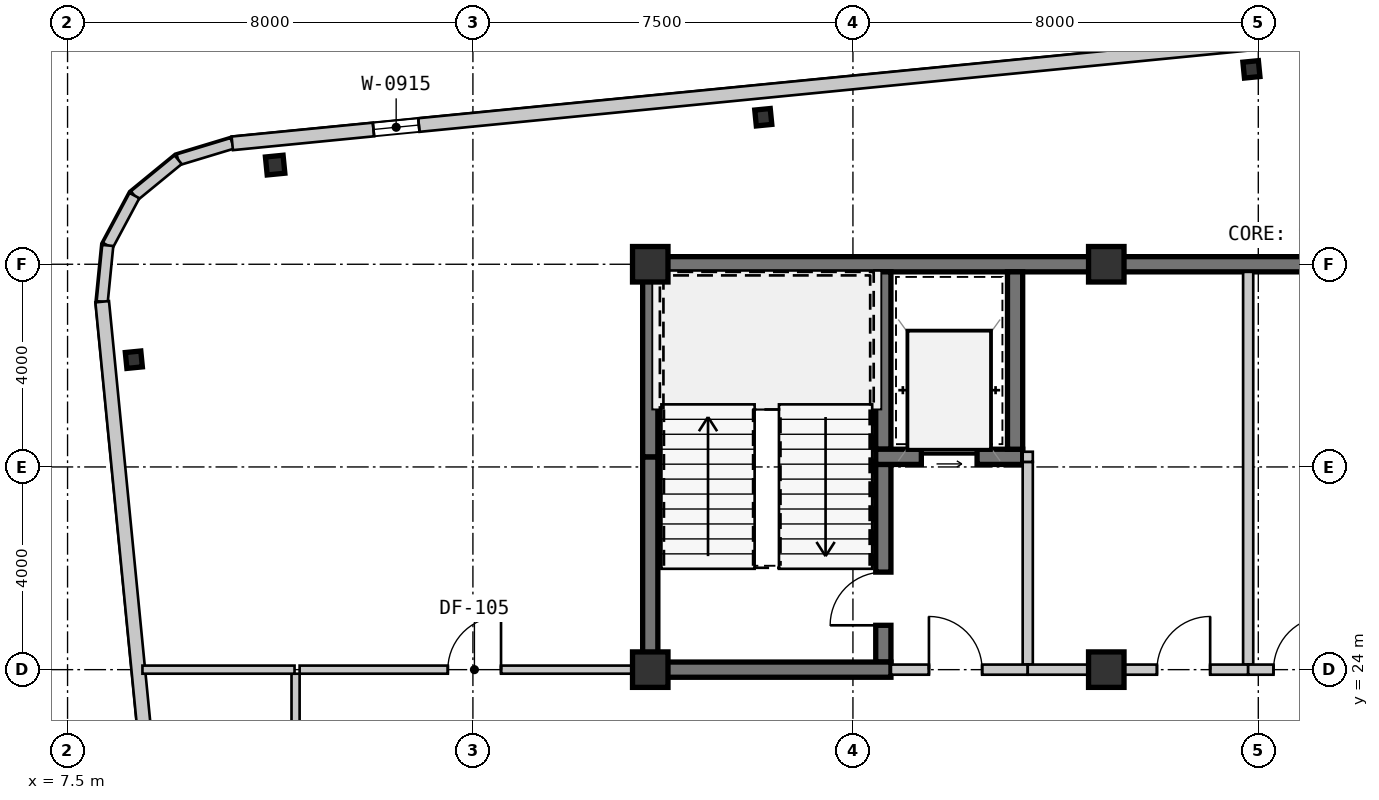
"""IFC4 building model, lengths in metres.
Left out: names, types, materials, properties, quantities, classifications, styles, units other than length and angle.
Written with IfcOpenShell. Run it as: python <this file> out.ifc"""

import sys

from ifc_helpers import new_model, si_unit, direction, frame, frame_2d, origin, origin_2d, place, context, subcontext, project, spatial, rectangle, i_section, extrude, source, transform, mapped, element, fill, save


model = new_model("IFC4")
c1 = context("Model", 3, precision=1e-05, world=origin(), true_north=direction((0.0, 1.0)))
c2 = subcontext(c1, "Body", "Model", "MODEL_VIEW")
j1 = project(units=[si_unit("LENGTHUNIT", "METRE"), si_unit("PLANEANGLEUNIT", "RADIAN")], contexts=[c1])
p1 = place(None, origin())
s1 = spatial("IfcSite", under=j1, at=p1, CompositionType="ELEMENT")
p2 = place(p1, origin())
s2 = spatial("IfcBuilding", under=s1, at=p2, CompositionType="ELEMENT")
p3 = place(p2, frame((0.0, 0.0, 112.35)))
s3 = spatial("IfcBuildingStorey", under=s2, at=p3, CompositionType="ELEMENT", Elevation=112.35)
m1 = source(origin(), c2, "Body", "SweptSolid", [
    extrude(rectangle(XDim=0.7, YDim=0.7, at=origin_2d()), origin(), (0.0, 0.0, 1.0), 4.2),
])
for number, where, z_axis, x_axis in (
    (1, (19.0, 24.0, 0.0), (0.0, 0.0, 1.0), (1.0, 0.0, 0.0)),
    (2, (28.0, 24.0, 0.0), (0.0, 0.0, 1.0), (1.0, 0.0, 0.0)),
    (3, (19.0, 32.0, 0.0), (0.0, 0.0, 1.0), (1.0, 0.0, 0.0)),
    (4, (28.0, 32.0, 0.0), (0.0, 0.0, 1.0), (1.0, 0.0, 0.0)),
):
    element("IfcColumn", number, at=place(p3, frame(where, z_axis=z_axis, x_axis=x_axis)), inside=s3, PredefinedType="COLUMN", context=c2, shape_type="MappedRepresentation", body=[
        mapped(m1, transform((0.0, 0.0, 0.0), scale=1.0)),
    ])
m2 = source(origin(), c2, "Body", "SweptSolid", [
    extrude(i_section(OverallWidth=0.35, OverallDepth=0.356, WebThickness=0.018, FlangeThickness=0.028, at=origin_2d()), origin(), (0.0, 0.0, 1.0), 4.2),
])
p4 = place(p3, frame((11.597, 33.957, 0.0), z_axis=(0.0, 0.0, 1.0), x_axis=(0.995227399982, 0.097582899759, 0.0)))
e5 = element("IfcColumn", 5, at=p4, inside=s3, PredefinedType="COLUMN", context=c2, shape_type="MappedRepresentation", body=[
    mapped(m2, transform((0.0, 0.0, 0.0), scale=1.0)),
])
m3 = source(origin(), c2, "Body", "SweptSolid", [
    extrude(i_section(OverallWidth=0.307, OverallDepth=0.315, WebThickness=0.012, FlangeThickness=0.019, at=origin_2d()), origin(), (0.0, 0.0, 1.0), 4.2),
])
for number, where, z_axis, x_axis in (
    (6, (21.231, 34.901, 0.0), (0.0, 0.0, 1.0), (0.995, 0.098, 0.0)),
    (7, (30.865, 35.846, 0.0), (0.0, 0.0, 1.0), (0.995, 0.098, 0.0)),
    (8, (8.808, 30.116, 0.0), (0.0, 0.0, 1.0), (0.995, 0.098, 0.0)),
):
    element("IfcColumn", number, at=place(p3, frame(where, z_axis=z_axis, x_axis=x_axis)), inside=s3, PredefinedType="COLUMN", context=c2, shape_type="MappedRepresentation", body=[
        mapped(m3, transform((0.0, 0.0, 0.0), scale=1.0)),
    ])
m4 = source(origin(), c2, "Body", "SweptSolid", [
    extrude(rectangle(XDim=1.116, YDim=0.22, at=frame_2d((0.558, 0.0))), origin(), (0.0, 0.0, 1.0), 3.78),
])
p5 = place(p3, frame((10.751, 34.386, 0.0), z_axis=(0.0, 0.0, 1.0), x_axis=(-0.957070388811, -0.289855603468, 0.0)))
e9 = element("IfcWall", 9, at=p5, inside=s3, PredefinedType="SOLIDWALL", context=c2, shape_type="MappedRepresentation", body=[
    mapped(m4, transform((0.0, 0.0, 0.0), scale=1.0)),
])
m5 = source(origin(), c2, "Body", "SweptSolid", [
    extrude(rectangle(XDim=1.116, YDim=0.22, at=frame_2d((0.558, 0.0))), origin(), (0.0, 0.0, 1.0), 3.78),
])
p6 = place(p3, frame((9.683, 34.063, 0.0), z_axis=(0.0, 0.0, 1.0), x_axis=(-0.773254916409, -0.634095287989, 0.0)))
e10 = element("IfcWall", 10, at=p6, inside=s3, PredefinedType="SOLIDWALL", context=c2, shape_type="MappedRepresentation", body=[
    mapped(m5, transform((0.0, 0.0, 0.0), scale=1.0)),
])
m6 = source(origin(), c2, "Body", "SweptSolid", [
    extrude(rectangle(XDim=1.116, YDim=0.22, at=frame_2d((0.558, 0.0))), origin(), (0.0, 0.0, 1.0), 3.78),
])
p7 = place(p3, frame((8.82, 33.355, 0.0), z_axis=(0.0, 0.0, 1.0), x_axis=(-0.471802540493, -0.881704237704, 0.0)))
e11 = element("IfcWall", 11, at=p7, inside=s3, PredefinedType="SOLIDWALL", context=c2, shape_type="MappedRepresentation", body=[
    mapped(m6, transform((0.0, 0.0, 0.0), scale=1.0)),
])
p8 = place(p3, frame((8.293, 32.371, 0.0), z_axis=(0.0, 0.0, 1.0), x_axis=(-0.098463783145, -0.99514063499, 0.0)))
e12 = element("IfcWall", 12, at=p8, inside=s3, PredefinedType="SOLIDWALL", context=c2, shape_type="MappedRepresentation", body=[
    mapped(m5, transform((0.0, 0.0, 0.0), scale=1.0)),
])
m7 = source(origin(), c2, "Body", "SweptSolid", [
    extrude(rectangle(XDim=50.0, YDim=0.27, at=frame_2d((25.0, 0.0))), origin(), (0.0, 0.0, 1.0), 3.78),
])
p9 = place(p3, frame((60.512, 39.266, 0.0), z_axis=(0.0, 0.0, 1.0), x_axis=(-0.995227362914, -0.0975832778, 0.0)))
e13 = element("IfcWall", 13, at=p9, inside=s3, PredefinedType="SOLIDWALL", context=c2, shape_type="MappedRepresentation", body=[
    mapped(m7, transform((0.0, 0.0, 0.0), scale=1.0)),
])
m8 = source(origin(), c2, "Body", "SweptSolid", [
    extrude(rectangle(XDim=0.9, YDim=1.5, at=frame_2d((0.45, 0.75))), frame((0.0, 0.145, 0.0), z_axis=(0.0, -1.0, 0.0), x_axis=(1.0, 0.0, 0.0)), (0.0, 0.0, 1.0), 0.29),
])
p10 = place(p9, frame((2.8, 0.0, 0.7)))
e14 = element("IfcOpeningElement", 14, at=p10, cuts=e13, PredefinedType="OPENING", context=c2, shape_type="MappedRepresentation", body=[
    mapped(m8, transform((0.0, 0.0, 0.0), scale=1.0)),
])
p11 = place(p9, frame((46.3, 0.0, 1.6)))
e15 = element("IfcOpeningElement", 15, at=p11, cuts=e13, PredefinedType="OPENING", context=c2, shape_type="MappedRepresentation", body=[
    mapped(m8, transform((0.0, 0.0, 0.0), scale=1.0)),
])
m9 = source(origin(), c2, "Body", "SweptSolid", [
    extrude(rectangle(XDim=15.207, YDim=0.27, at=frame_2d((7.603, 0.0))), origin(), (0.0, 0.0, 1.0), 3.78),
])
p12 = place(p3, frame((8.184, 31.261, 0.0), z_axis=(0.0, 0.0, 1.0), x_axis=(0.097581713594, -0.995227516286, 0.0)))
e16 = element("IfcWall", 16, at=p12, inside=s3, PredefinedType="SOLIDWALL", context=c2, shape_type="MappedRepresentation", body=[
    mapped(m9, transform((0.0, 0.0, 0.0), scale=1.0)),
])
m10 = source(origin(), c2, "Body", "SweptSolid", [
    extrude(rectangle(XDim=9.15, YDim=0.3, at=frame_2d((4.575, 0.0))), origin(), (0.0, 0.0, 1.0), 3.78),
])
p13 = place(p3, frame((18.85, 32.0, 0.0), z_axis=(0.0, 0.0, 1.0), x_axis=(1.0, 0.0, 0.0)))
e17 = element("IfcWall", 17, at=p13, inside=s3, PredefinedType="SHEAR", context=c2, shape_type="MappedRepresentation", body=[
    mapped(m10, transform((0.0, 0.0, 0.0), scale=1.0)),
])
m11 = source(origin(), c2, "Body", "SweptSolid", [
    extrude(rectangle(XDim=11.2, YDim=0.3, at=frame_2d((5.6, 0.0))), origin(), (0.0, 0.0, 1.0), 3.78),
])
p14 = place(p3, frame((28.0, 32.0, 0.0), z_axis=(0.0, 0.0, 1.0), x_axis=(1.0, 0.0, 0.0)))
e18 = element("IfcWall", 18, at=p14, inside=s3, PredefinedType="SHEAR", context=c2, shape_type="MappedRepresentation", body=[
    mapped(m11, transform((0.0, 0.0, 0.0), scale=1.0)),
])
m12 = source(origin(), c2, "Body", "SweptSolid", [
    extrude(rectangle(XDim=4.05, YDim=0.3, at=frame_2d((2.025, 0.0))), origin(), (0.0, 0.0, 1.0), 3.78),
])
p15 = place(p3, frame((19.0, 24.15, 0.0), z_axis=(0.0, 0.0, 1.0), x_axis=(0.0, 1.0, 0.0)))
e19 = element("IfcWall", 19, at=p15, inside=s3, PredefinedType="SHEAR", context=c2, shape_type="MappedRepresentation", body=[
    mapped(m12, transform((0.0, 0.0, 0.0), scale=1.0)),
])
m13 = source(origin(), c2, "Body", "SweptSolid", [
    extrude(rectangle(XDim=3.65, YDim=0.3, at=frame_2d((1.825, 0.0))), origin(), (0.0, 0.0, 1.0), 3.78),
])
p16 = place(p3, frame((19.0, 28.2, 0.0), z_axis=(0.0, 0.0, 1.0), x_axis=(0.0, 1.0, 0.0)))
e20 = element("IfcWall", 20, at=p16, inside=s3, PredefinedType="SHEAR", context=c2, shape_type="MappedRepresentation", body=[
    mapped(m13, transform((0.0, 0.0, 0.0), scale=1.0)),
])
m14 = source(origin(), c2, "Body", "SweptSolid", [
    extrude(rectangle(XDim=3.5, YDim=0.3, at=frame_2d((1.75, 0.0))), origin(), (0.0, 0.0, 1.0), 3.78),
])
p17 = place(p3, frame((23.6, 28.35, 0.0), z_axis=(0.0, 0.0, 1.0), x_axis=(0.0, 1.0, 0.0)))
e21 = element("IfcWall", 21, at=p17, inside=s3, PredefinedType="SHEAR", context=c2, shape_type="MappedRepresentation", body=[
    mapped(m14, transform((0.0, 0.0, 0.0), scale=1.0)),
])
m15 = source(origin(), c2, "Body", "SweptSolid", [
    extrude(rectangle(XDim=3.9, YDim=0.3, at=frame_2d((1.95, 0.0))), origin(), (0.0, 0.0, 1.0), 3.78),
])
p18 = place(p3, frame((23.6, 24.15, 0.0), z_axis=(0.0, 0.0, 1.0), x_axis=(0.0, 1.0, 0.0)))
e22 = element("IfcWall", 22, at=p18, inside=s3, PredefinedType="SHEAR", context=c2, shape_type="MappedRepresentation", body=[
    mapped(m15, transform((0.0, 0.0, 0.0), scale=1.0)),
])
m16 = source(origin(), c2, "Body", "SweptSolid", [
    extrude(rectangle(XDim=1.05, YDim=2.1, at=frame_2d((0.525, 1.05))), frame((0.0, 0.16, 0.0), z_axis=(0.0, -1.0, 0.0), x_axis=(1.0, 0.0, 0.0)), (0.0, 0.0, 1.0), 0.32),
])
p19 = place(p18, frame((0.725, 0.0, 0.0)))
e23 = element("IfcOpeningElement", 23, at=p19, cuts=e22, PredefinedType="OPENING", context=c2, shape_type="MappedRepresentation", body=[
    mapped(m16, transform((0.0, 0.0, 0.0), scale=1.0)),
])
m17 = source(origin(), c2, "Body", "SweptSolid", [
    extrude(rectangle(XDim=4.9, YDim=0.3, at=frame_2d((2.45, 0.0))), origin(), (0.0, 0.0, 1.0), 3.78),
])
p20 = place(p3, frame((18.85, 24.0, 0.0), z_axis=(0.0, 0.0, 1.0), x_axis=(1.0, 0.0, 0.0)))
e24 = element("IfcWall", 24, at=p20, inside=s3, PredefinedType="SHEAR", context=c2, shape_type="MappedRepresentation", body=[
    mapped(m17, transform((0.0, 0.0, 0.0), scale=1.0)),
])
m18 = source(origin(), c2, "Body", "SweptSolid", [
    extrude(rectangle(XDim=2.9, YDim=0.3, at=frame_2d((1.45, 0.0))), origin(), (0.0, 0.0, 1.0), 3.78),
])
p21 = place(p3, frame((23.45, 28.2, 0.0), z_axis=(0.0, 0.0, 1.0), x_axis=(1.0, 0.0, 0.0)))
e25 = element("IfcWall", 25, at=p21, inside=s3, PredefinedType="SHEAR", context=c2, shape_type="MappedRepresentation", body=[
    mapped(m18, transform((0.0, 0.0, 0.0), scale=1.0)),
])
m19 = source(origin(), c2, "Body", "SweptSolid", [
    extrude(rectangle(XDim=1.1, YDim=2.15, at=frame_2d((0.55, 1.075))), frame((0.0, 0.16, 0.0), z_axis=(0.0, -1.0, 0.0), x_axis=(1.0, 0.0, 0.0)), (0.0, 0.0, 1.0), 0.32),
])
p22 = place(p21, frame((0.9, 0.0, 0.0)))
e26 = element("IfcOpeningElement", 26, at=p22, cuts=e25, PredefinedType="OPENING", context=c2, shape_type="MappedRepresentation", body=[
    mapped(m19, transform((0.0, 0.0, 0.0), scale=1.0)),
])
p23 = place(p3, frame((26.2, 28.35, 0.0), z_axis=(0.0, 0.0, 1.0), x_axis=(0.0, 1.0, 0.0)))
e27 = element("IfcWall", 27, at=p23, inside=s3, PredefinedType="SHEAR", context=c2, shape_type="MappedRepresentation", body=[
    mapped(m14, transform((0.0, 0.0, 0.0), scale=1.0)),
])
m20 = source(origin(), c2, "Body", "SweptSolid", [
    extrude(rectangle(XDim=4.0, YDim=0.2, at=frame_2d((2.0, 0.0))), origin(), (0.0, 0.0, 1.0), 3.78),
])
p24 = place(p3, frame((26.45, 24.1, 0.0), z_axis=(0.0, 0.0, 1.0), x_axis=(0.0, 1.0, 0.0)))
e28 = element("IfcWall", 28, at=p24, inside=s3, PredefinedType="SOLIDWALL", context=c2, shape_type="MappedRepresentation", body=[
    mapped(m20, transform((0.0, 0.0, 0.0), scale=1.0)),
])
m21 = source(origin(), c2, "Body", "SweptSolid", [
    extrude(rectangle(XDim=2.7, YDim=0.2, at=frame_2d((1.35, 0.0))), origin(), (0.0, 0.0, 1.0), 3.32),
])
p25 = place(p3, frame((23.75, 24.0, 0.0), z_axis=(0.0, 0.0, 1.0), x_axis=(1.0, 0.0, 0.0)))
e29 = element("IfcWall", 29, at=p25, inside=s3, PredefinedType="SOLIDWALL", context=c2, shape_type="MappedRepresentation", body=[
    mapped(m21, transform((0.0, 0.0, 0.0), scale=1.0)),
])
m22 = source(origin(), c2, "Body", "SweptSolid", [
    extrude(rectangle(XDim=1.05, YDim=2.1, at=frame_2d((0.525, 1.05))), frame((0.0, 0.11, 0.0), z_axis=(0.0, -1.0, 0.0), x_axis=(1.0, 0.0, 0.0)), (0.0, 0.0, 1.0), 0.22),
])
p26 = place(p25, frame((0.75, 0.0, 0.0)))
e30 = element("IfcOpeningElement", 30, at=p26, cuts=e29, PredefinedType="OPENING", context=c2, shape_type="MappedRepresentation", body=[
    mapped(m22, transform((0.0, 0.0, 0.0), scale=1.0)),
])
m23 = source(origin(), c2, "Body", "SweptSolid", [
    extrude(rectangle(XDim=7.75, YDim=0.2, at=frame_2d((3.875, 0.0))), origin(), (0.0, 0.0, 1.0), 3.78),
])
p27 = place(p3, frame((30.8, 31.85, 0.0), z_axis=(0.0, 0.0, 1.0), x_axis=(0.0, -1.0, 0.0)))
e31 = element("IfcWall", 31, at=p27, inside=s3, PredefinedType="SOLIDWALL", context=c2, shape_type="MappedRepresentation", body=[
    mapped(m23, transform((0.0, 0.0, 0.0), scale=1.0)),
])
m24 = source(origin(), c2, "Body", "SweptSolid", [
    extrude(rectangle(XDim=4.35, YDim=0.2, at=frame_2d((2.175, 0.0))), origin(), (0.0, 0.0, 1.0), 3.32),
])
p28 = place(p3, frame((30.8, 24.0, 0.0), z_axis=(0.0, 0.0, 1.0), x_axis=(-1.0, 0.0, 0.0)))
e32 = element("IfcWall", 32, at=p28, inside=s3, PredefinedType="SOLIDWALL", context=c2, shape_type="MappedRepresentation", body=[
    mapped(m24, transform((0.0, 0.0, 0.0), scale=1.0)),
])
p29 = place(p28, frame((0.75, 0.0, 0.0)))
e33 = element("IfcOpeningElement", 33, at=p29, cuts=e32, PredefinedType="OPENING", context=c2, shape_type="MappedRepresentation", body=[
    mapped(m22, transform((0.0, 0.0, 0.0), scale=1.0)),
])
m25 = source(origin(), c2, "Body", "SweptSolid", [
    extrude(rectangle(XDim=2.05, YDim=0.2, at=frame_2d((1.025, 0.0))), origin(), (0.0, 0.0, 1.0), 3.32),
])
p30 = place(p3, frame((32.85, 24.0, 0.0), z_axis=(0.0, 0.0, 1.0), x_axis=(-1.0, 0.0, 0.0)))
e34 = element("IfcWall", 34, at=p30, inside=s3, PredefinedType="SOLIDWALL", context=c2, shape_type="MappedRepresentation", body=[
    mapped(m25, transform((0.0, 0.0, 0.0), scale=1.0)),
])
p31 = place(p30, frame((0.5, 0.0, 0.0)))
e35 = element("IfcOpeningElement", 35, at=p31, cuts=e34, PredefinedType="OPENING", context=c2, shape_type="MappedRepresentation", body=[
    mapped(m22, transform((0.0, 0.0, 0.0), scale=1.0)),
])
m26 = source(origin(), c2, "Body", "SweptSolid", [
    extrude(rectangle(XDim=6.77, YDim=0.16, at=frame_2d((3.385, 0.0))), origin(), (0.0, 0.0, 1.0), 3.78),
])
p32 = place(p3, frame((12.08, 24.0, 0.0), z_axis=(0.0, 0.0, 1.0), x_axis=(1.0, 0.0, 0.0)))
e36 = element("IfcWall", 36, at=p32, inside=s3, PredefinedType="PARTITIONING", context=c2, shape_type="MappedRepresentation", body=[
    mapped(m26, transform((0.0, 0.0, 0.0), scale=1.0)),
])
m27 = source(origin(), c2, "Body", "SweptSolid", [
    extrude(rectangle(XDim=1.05, YDim=2.1, at=frame_2d((0.525, 1.05))), frame((0.0, 0.09, 0.0), z_axis=(0.0, -1.0, 0.0), x_axis=(1.0, 0.0, 0.0)), (0.0, 0.0, 1.0), 0.18),
])
p33 = place(p32, frame((2.925, 0.0, 0.0)))
e37 = element("IfcOpeningElement", 37, at=p33, cuts=e36, PredefinedType="OPENING", context=c2, shape_type="MappedRepresentation", body=[
    mapped(m27, transform((0.0, 0.0, 0.0), scale=1.0)),
])
m28 = source(origin(), c2, "Body", "SweptSolid", [
    extrude(rectangle(XDim=2.44, YDim=0.16, at=frame_2d((1.22, 0.0))), origin(), (0.0, 0.0, 1.0), 3.78),
])
p34 = place(p3, frame((12.0, 21.48, 0.0), z_axis=(0.0, 0.0, 1.0), x_axis=(0.0, 1.0, 0.0)))
e38 = element("IfcWall", 38, at=p34, inside=s3, PredefinedType="PARTITIONING", context=c2, shape_type="MappedRepresentation", body=[
    mapped(m28, transform((0.0, 0.0, 0.0), scale=1.0)),
])
m29 = source(origin(), c2, "Body", "SweptSolid", [
    extrude(rectangle(XDim=3.002, YDim=0.16, at=frame_2d((1.501, 0.0))), origin(), (0.0, 0.0, 1.0), 3.78),
])
p35 = place(p3, frame((11.98, 24.0, 0.0), z_axis=(0.0, 0.0, 1.0), x_axis=(-1.0, 0.0, 0.0)))
e39 = element("IfcWall", 39, at=p35, inside=s3, PredefinedType="PARTITIONING", context=c2, shape_type="MappedRepresentation", body=[
    mapped(m29, transform((0.0, 0.0, 0.0), scale=1.0)),
])
m30 = source(origin(), c2, "Body", "SweptSolid", [
    extrude(rectangle(XDim=0.2, YDim=0.2, at=frame_2d((0.1, 0.0))), origin(), (0.0, 0.0, 1.0), 3.78),
])
p36 = place(p3, frame((26.35, 28.2, 0.0), z_axis=(0.0, 0.0, 1.0), x_axis=(1.0, 0.0, 0.0)))
e40 = element("IfcWall", 40, at=p36, inside=s3, PredefinedType="SOLIDWALL", context=c2, shape_type="MappedRepresentation", body=[
    mapped(m30, transform((0.0, 0.0, 0.0), scale=1.0)),
])
m31 = source(origin(), c2, "Body", "SweptSolid", [
    extrude(rectangle(XDim=0.9, YDim=1.5, at=frame_2d((0.45, 0.75))), frame((0.0, 0.03, 0.0), z_axis=(0.0, -1.0, 0.0), x_axis=(1.0, 0.0, 0.0)), (0.0, 0.0, 1.0), 0.06),
])
p37 = place(p11, origin())
e41 = element("IfcWindow", 41, at=p37, inside=s3, PartitioningType="SINGLE_PANEL", PredefinedType="WINDOW", context=c2, shape_type="MappedRepresentation", body=[
    mapped(m31, transform((0.0, 0.0, 0.0), scale=1.0)),
])
fill(e15, e41)
m32 = source(origin(), c2, "Body", "SweptSolid", [
    extrude(rectangle(XDim=1.05, YDim=2.1, at=frame_2d((0.525, 1.05))), frame((0.0, 0.025, 0.0), z_axis=(0.0, -1.0, 0.0), x_axis=(1.0, 0.0, 0.0)), (0.0, 0.0, 1.0), 0.05),
])
p38 = place(p19, origin())
e42 = element("IfcDoor", 42, at=p38, inside=s3, OperationType="SINGLE_SWING_LEFT", PredefinedType="DOOR", context=c2, shape_type="MappedRepresentation", body=[
    mapped(m32, transform((0.0, 0.0, 0.0), scale=1.0)),
])
fill(e23, e42)
m33 = source(origin(), c2, "Body", "SweptSolid", [
    extrude(rectangle(XDim=1.1, YDim=2.15, at=frame_2d((0.55, 1.075))), frame((0.0, 0.025, 0.0), z_axis=(0.0, -1.0, 0.0), x_axis=(1.0, 0.0, 0.0)), (0.0, 0.0, 1.0), 0.05),
])
p39 = place(p22, origin())
e43 = element("IfcDoor", 43, at=p39, inside=s3, OperationType="SLIDING_TO_LEFT", PredefinedType="DOOR", context=c2, shape_type="MappedRepresentation", body=[
    mapped(m33, transform((0.0, 0.0, 0.0), scale=1.0)),
])
fill(e26, e43)
p40 = place(p26, origin())
e44 = element("IfcDoor", 44, at=p40, inside=s3, OperationType="SINGLE_SWING_LEFT", PredefinedType="DOOR", context=c2, shape_type="MappedRepresentation", body=[
    mapped(m32, transform((0.0, 0.0, 0.0), scale=1.0)),
])
fill(e30, e44)
p41 = place(p29, frame((1.05, 0.0, 0.0), z_axis=(0.0, 0.0, 1.0), x_axis=(-1.0, 0.0, 0.0)))
e45 = element("IfcDoor", 45, at=p41, inside=s3, OperationType="SINGLE_SWING_RIGHT", PredefinedType="DOOR", context=c2, shape_type="MappedRepresentation", body=[
    mapped(m32, transform((0.0, 0.0, 0.0), scale=1.0)),
])
fill(e33, e45)
p42 = place(p31, frame((1.05, 0.0, 0.0), z_axis=(0.0, 0.0, 1.0), x_axis=(-1.0, 0.0, 0.0)))
e46 = element("IfcDoor", 46, at=p42, inside=s3, OperationType="SINGLE_SWING_RIGHT", PredefinedType="DOOR", context=c2, shape_type="MappedRepresentation", body=[
    mapped(m32, transform((0.0, 0.0, 0.0), scale=1.0)),
])
fill(e35, e46)
p43 = place(p33, origin())
e47 = element("IfcDoor", 47, at=p43, inside=s3, OperationType="SINGLE_SWING_RIGHT", PredefinedType="DOOR", context=c2, shape_type="MappedRepresentation", body=[
    mapped(m32, transform((0.0, 0.0, 0.0), scale=1.0)),
])
fill(e37, e47)
save(model, sys.argv[1])
